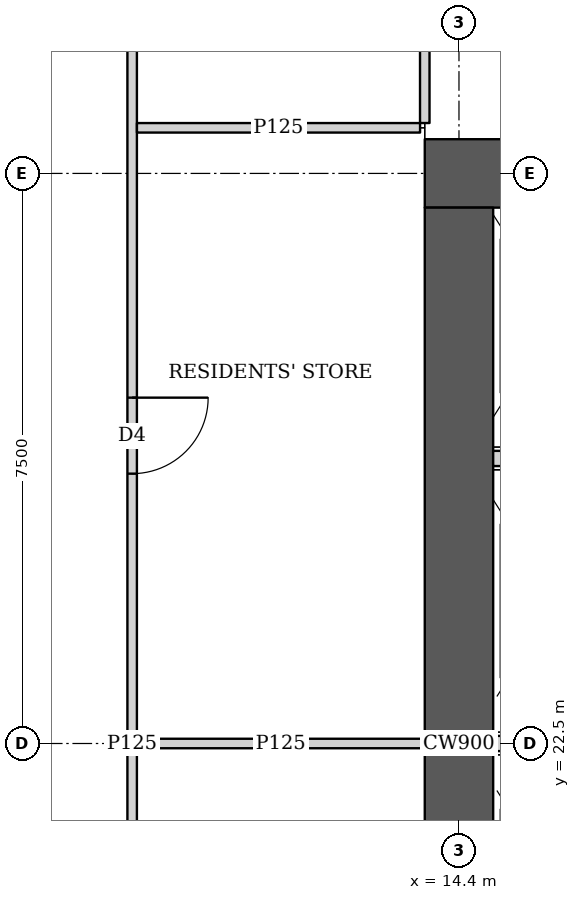
"""IFC4 building model, lengths in metres.
Left out: names, types, materials, properties, quantities, classifications, styles, units other than length and angle.
Written with IfcOpenShell. Run it as: python <this file> out.ifc"""

import sys

from ifc_helpers import new_model, si_unit, direction, frame, frame_2d, origin, place, context, subcontext, project, spatial, rectangle, extrude, element, fill, save


model = new_model("IFC4")
c1 = context("Model", 3, precision=1e-05, world=origin(), true_north=direction((0.0, 1.0)))
c2 = subcontext(c1, "Body", "Model", "MODEL_VIEW")
j1 = project(units=[si_unit("LENGTHUNIT", "METRE"), si_unit("PLANEANGLEUNIT", "RADIAN")], contexts=[c1])
p1 = place(None, origin())
s1 = spatial("IfcSite", under=j1, at=p1, CompositionType="ELEMENT")
p2 = place(p1, origin())
s2 = spatial("IfcBuilding", under=s1, at=p2, CompositionType="ELEMENT")
p3 = place(p2, frame((0.0, 0.0, 122.9)))
s3 = spatial("IfcBuildingStorey", under=s2, at=p3, CompositionType="ELEMENT", Elevation=122.9)
p4 = place(p3, frame((13.95, 30.0, 0.0), z_axis=(0.0, 0.0, 1.0), x_axis=(1.0, 0.0, 0.0)))
e1 = element("IfcWall", 1, at=p4, inside=s3, PredefinedType="SHEAR", context=c2, shape_type="SweptSolid", body=[
    extrude(rectangle(XDim=15.3, YDim=0.9, at=frame_2d((7.65, 0.0))), origin(), (0.0, 0.0, 1.0), 3.75),
])
p5 = place(p4, frame((4.45, 0.0, 0.0)))
e2 = element("IfcOpeningElement", 2, at=p5, cuts=e1, PredefinedType="OPENING", context=c2, shape_type="SweptSolid", body=[
    extrude(rectangle(XDim=1.8, YDim=2.1, at=frame_2d((0.9, 1.05))), frame((0.0, 0.46, 0.0), z_axis=(0.0, -1.0, 0.0), x_axis=(1.0, 0.0, 0.0)), (0.0, 0.0, 1.0), 0.92),
])
p6 = place(p4, frame((10.7, 0.0, 0.0)))
e3 = element("IfcOpeningElement", 3, at=p6, cuts=e1, PredefinedType="OPENING", context=c2, shape_type="SweptSolid", body=[
    extrude(rectangle(XDim=1.1, YDim=2.1, at=frame_2d((0.55, 1.05))), frame((0.0, 0.46, 0.0), z_axis=(0.0, -1.0, 0.0), x_axis=(1.0, 0.0, 0.0)), (0.0, 0.0, 1.0), 0.92),
])
p7 = place(p3, frame((14.4, 15.45, 0.0), z_axis=(0.0, 0.0, 1.0), x_axis=(0.0, 1.0, 0.0)))
e4 = element("IfcWall", 4, at=p7, inside=s3, PredefinedType="SHEAR", context=c2, shape_type="SweptSolid", body=[
    extrude(rectangle(XDim=14.1, YDim=0.9, at=frame_2d((7.05, 0.0))), origin(), (0.0, 0.0, 1.0), 3.75),
])
p8 = place(p3, frame((10.1, 10.05, 0.0), z_axis=(0.0, 0.0, 1.0), x_axis=(0.0, 1.0, 0.0)))
e5 = element("IfcWall", 5, at=p8, inside=s3, PredefinedType="PARTITIONING", context=c2, shape_type="SweptSolid", body=[
    extrude(rectangle(XDim=24.9, YDim=0.125, at=frame_2d((12.45, 0.0))), origin(), (0.0, 0.0, 1.0), 3.5),
])
p9 = place(p8, frame((1.675, 0.0, 0.0)))
e6 = element("IfcOpeningElement", 6, at=p9, cuts=e5, PredefinedType="OPENING", context=c2, shape_type="SweptSolid", body=[
    extrude(rectangle(XDim=1.0, YDim=2.1, at=frame_2d((0.5, 1.05))), frame((0.0, 0.073, 0.0), z_axis=(0.0, -1.0, 0.0), x_axis=(1.0, 0.0, 0.0)), (0.0, 0.0, 1.0), 0.145),
])
p10 = place(p8, frame((7.9, 0.0, 0.0)))
e7 = element("IfcOpeningElement", 7, at=p10, cuts=e5, PredefinedType="OPENING", context=c2, shape_type="SweptSolid", body=[
    extrude(rectangle(XDim=1.0, YDim=2.1, at=frame_2d((0.5, 1.05))), frame((0.0, 0.073, 0.0), z_axis=(0.0, -1.0, 0.0), x_axis=(1.0, 0.0, 0.0)), (0.0, 0.0, 1.0), 0.145),
])
p11 = place(p8, frame((16.0, 0.0, 0.0)))
e8 = element("IfcOpeningElement", 8, at=p11, cuts=e5, PredefinedType="OPENING", context=c2, shape_type="SweptSolid", body=[
    extrude(rectangle(XDim=1.0, YDim=2.1, at=frame_2d((0.5, 1.05))), frame((0.0, 0.073, 0.0), z_axis=(0.0, -1.0, 0.0), x_axis=(1.0, 0.0, 0.0)), (0.0, 0.0, 1.0), 0.145),
])
p12 = place(p8, frame((22.225, 0.0, 0.0)))
e9 = element("IfcOpeningElement", 9, at=p12, cuts=e5, PredefinedType="OPENING", context=c2, shape_type="SweptSolid", body=[
    extrude(rectangle(XDim=1.0, YDim=2.1, at=frame_2d((0.5, 1.05))), frame((0.0, 0.073, 0.0), z_axis=(0.0, -1.0, 0.0), x_axis=(1.0, 0.0, 0.0)), (0.0, 0.0, 1.0), 0.145),
])
p13 = place(p3, frame((10.163, 22.5, 0.0), z_axis=(0.0, 0.0, 1.0), x_axis=(1.0, 0.0, 0.0)))
e10 = element("IfcWall", 10, at=p13, inside=s3, PredefinedType="PARTITIONING", context=c2, shape_type="SweptSolid", body=[
    extrude(rectangle(XDim=3.787, YDim=0.125, at=frame_2d((1.894, 0.0))), origin(), (0.0, 0.0, 1.0), 3.5),
])
p14 = place(p3, frame((10.163, 30.6, 0.0), z_axis=(0.0, 0.0, 1.0), x_axis=(1.0, 0.0, 0.0)))
e11 = element("IfcWall", 11, at=p14, inside=s3, PredefinedType="PARTITIONING", context=c2, shape_type="SweptSolid", body=[
    extrude(rectangle(XDim=3.725, YDim=0.125, at=frame_2d((1.862, 0.0))), origin(), (0.0, 0.0, 1.0), 3.5),
])
p15 = place(p3, frame((13.95, 30.663, 0.0), z_axis=(0.0, 0.0, 1.0), x_axis=(0.0, 1.0, 0.0)))
e12 = element("IfcWall", 12, at=p15, inside=s3, PredefinedType="PARTITIONING", context=c2, shape_type="SweptSolid", body=[
    extrude(rectangle(XDim=4.174, YDim=0.125, at=frame_2d((2.087, 0.0))), origin(), (0.0, 0.0, 1.0), 3.5),
])
for number, where, z_axis, x_axis in (
    (13, (14.85, 22.5, 0.0), (0.0, 0.0, 1.0), (1.0, 0.0, 0.0)),
    (14, (14.85, 26.25, 0.0), (0.0, 0.0, 1.0), (1.0, 0.0, 0.0)),
):
    element("IfcWall", number, at=place(p3, frame(where, z_axis=z_axis, x_axis=x_axis)), inside=s3, PredefinedType="SOLIDWALL", context=c2, shape_type="SweptSolid", body=[
        extrude(rectangle(XDim=1.95, YDim=0.2, at=frame_2d((0.975, 0.0))), origin(), (0.0, 0.0, 1.0), 3.5),
    ])
p16 = place(p11, origin())
e15 = element("IfcDoor", 15, at=p16, inside=s3, OperationType="SINGLE_SWING_LEFT", PredefinedType="DOOR", context=c2, shape_type="SweptSolid", body=[
    extrude(rectangle(XDim=1.0, YDim=2.1, at=frame_2d((0.5, 1.05))), frame((0.0, 0.025, 0.0), z_axis=(0.0, -1.0, 0.0), x_axis=(1.0, 0.0, 0.0)), (0.0, 0.0, 1.0), 0.05),
])
fill(e8, e15)
save(model, sys.argv[1])
